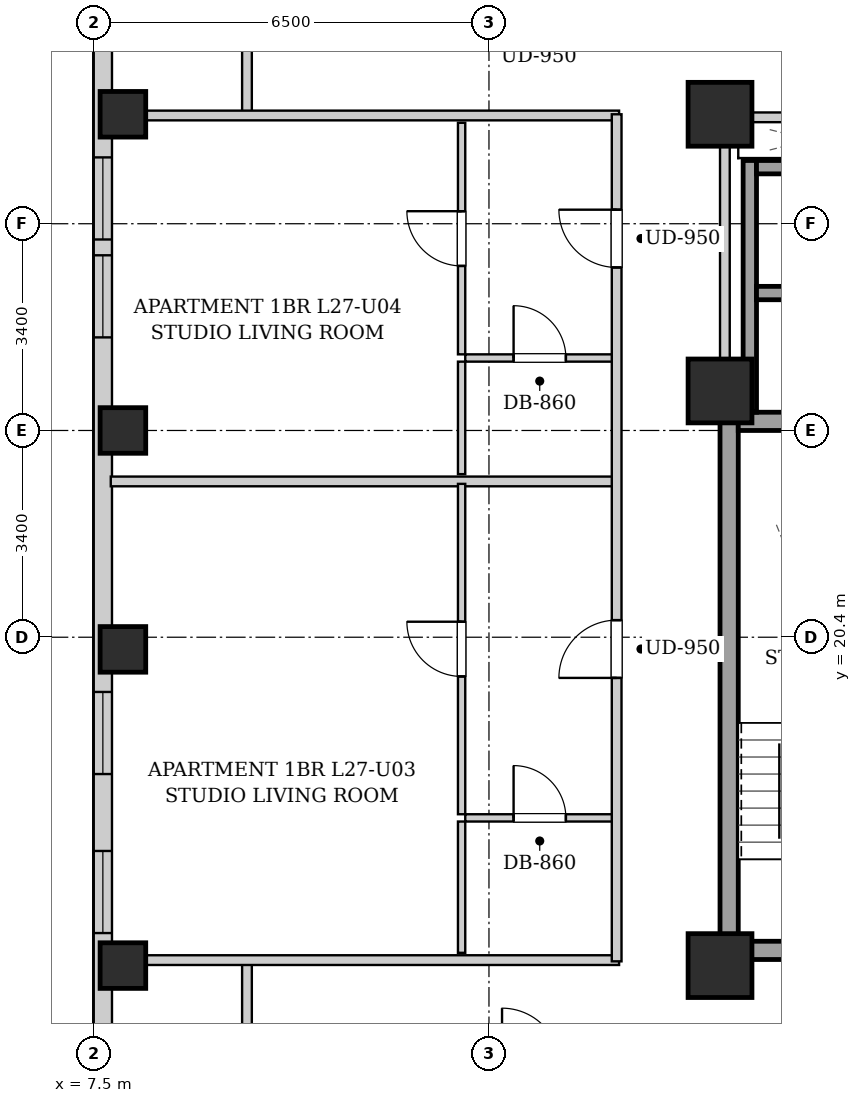
"""IFC4 building model, lengths in metres.
Left out: names, types, materials, properties, quantities, classifications, styles, units other than length and angle.
Written with IfcOpenShell. Run it as: python <this file> out.ifc"""

import sys

from ifc_helpers import new_model, si_unit, direction, frame, frame_2d, origin, origin_2d, place, context, subcontext, project, spatial, rectangle, extrude, element, fill, save


model = new_model("IFC4")
c1 = context("Model", 3, precision=1e-05, world=origin(), true_north=direction((0.0, 1.0)))
c2 = subcontext(c1, "Body", "Model", "MODEL_VIEW")
j1 = project(units=[si_unit("LENGTHUNIT", "METRE"), si_unit("PLANEANGLEUNIT", "RADIAN")], contexts=[c1])
p1 = place(None, origin())
s1 = spatial("IfcSite", under=j1, at=p1, CompositionType="ELEMENT")
p2 = place(p1, origin())
s2 = spatial("IfcBuilding", under=s1, at=p2, CompositionType="ELEMENT")
p3 = place(p2, frame((0.0, 0.0, 97.5)))
s3 = spatial("IfcBuildingStorey", under=s2, at=p3, CompositionType="ELEMENT", Elevation=97.5)
for number, where, z_axis, x_axis in (
    (1, (7.98, 15.0, 0.0), (0.0, 0.0, 1.0), (1.0, 0.0, 0.0)),
    (2, (7.98, 20.2, 0.0), (0.0, 0.0, 1.0), (1.0, 0.0, 0.0)),
    (3, (7.98, 23.8, 0.0), (0.0, 0.0, 1.0), (1.0, 0.0, 0.0)),
    (4, (7.98, 29.0, 0.0), (0.0, 0.0, 1.0), (1.0, 0.0, 0.0)),
):
    element("IfcColumn", number, at=place(p3, frame(where, z_axis=z_axis, x_axis=x_axis)), inside=s3, PredefinedType="COLUMN", context=c2, shape_type="SweptSolid", body=[
        extrude(rectangle(XDim=0.75, YDim=0.75, at=origin_2d()), origin(), (0.0, 0.0, 1.0), 3.2),
    ])
for number, where, z_axis, x_axis in (
    (5, (17.8, 15.0, 0.0), (0.0, 0.0, 1.0), (1.0, 0.0, 0.0)),
    (6, (17.8, 29.0, 0.0), (0.0, 0.0, 1.0), (1.0, 0.0, 0.0)),
    (7, (17.8, 24.45, 0.0), (0.0, 0.0, 1.0), (1.0, 0.0, 0.0)),
):
    element("IfcColumn", number, at=place(p3, frame(where, z_axis=z_axis, x_axis=x_axis)), inside=s3, PredefinedType="COLUMN", context=c2, shape_type="SweptSolid", body=[
        extrude(rectangle(XDim=1.05, YDim=1.05, at=origin_2d()), origin(), (0.0, 0.0, 1.0), 3.2),
    ])
p4 = place(p3, frame((7.65, 2.5, 0.0), z_axis=(0.0, 0.0, 1.0), x_axis=(0.0, 1.0, 0.0)))
e8 = element("IfcWall", 8, at=p4, inside=s3, PredefinedType="SOLIDWALL", context=c2, shape_type="SweptSolid", body=[
    extrude(rectangle(XDim=38.3, YDim=0.3, at=frame_2d((19.15, 0.0))), origin(), (0.0, 0.0, 1.0), 2.94),
])
p5 = place(p4, frame((3.38, 0.0, 0.55)))
e9 = element("IfcOpeningElement", 9, at=p5, cuts=e8, PredefinedType="OPENING", context=c2, shape_type="SweptSolid", body=[
    extrude(rectangle(XDim=1.35, YDim=1.2, at=frame_2d((0.675, 0.6))), frame((0.0, 0.16, 0.0), z_axis=(0.0, -1.0, 0.0), x_axis=(1.0, 0.0, 0.0)), (0.0, 0.0, 1.0), 0.32),
])
p6 = place(p4, frame((1.135, 0.0, 0.55)))
e10 = element("IfcOpeningElement", 10, at=p6, cuts=e8, PredefinedType="OPENING", context=c2, shape_type="SweptSolid", body=[
    extrude(rectangle(XDim=1.35, YDim=1.2, at=frame_2d((0.675, 0.6))), frame((0.0, 0.16, 0.0), z_axis=(0.0, -1.0, 0.0), x_axis=(1.0, 0.0, 0.0)), (0.0, 0.0, 1.0), 0.32),
])
p7 = place(p4, frame((33.946, 0.0, 0.55)))
e11 = element("IfcOpeningElement", 11, at=p7, cuts=e8, PredefinedType="OPENING", context=c2, shape_type="SweptSolid", body=[
    extrude(rectangle(XDim=1.35, YDim=1.2, at=frame_2d((0.675, 0.6))), frame((0.0, 0.16, 0.0), z_axis=(0.0, -1.0, 0.0), x_axis=(1.0, 0.0, 0.0)), (0.0, 0.0, 1.0), 0.32),
])
p8 = place(p4, frame((32.035, 0.0, 0.55)))
e12 = element("IfcOpeningElement", 12, at=p8, cuts=e8, PredefinedType="OPENING", context=c2, shape_type="SweptSolid", body=[
    extrude(rectangle(XDim=1.35, YDim=1.2, at=frame_2d((0.675, 0.6))), frame((0.0, 0.16, 0.0), z_axis=(0.0, -1.0, 0.0), x_axis=(1.0, 0.0, 0.0)), (0.0, 0.0, 1.0), 0.32),
])
p9 = place(p4, frame((15.65, 0.0, 0.55)))
e13 = element("IfcOpeningElement", 13, at=p9, cuts=e8, PredefinedType="OPENING", context=c2, shape_type="SweptSolid", body=[
    extrude(rectangle(XDim=1.35, YDim=1.2, at=frame_2d((0.675, 0.6))), frame((0.0, 0.16, 0.0), z_axis=(0.0, -1.0, 0.0), x_axis=(1.0, 0.0, 0.0)), (0.0, 0.0, 1.0), 0.32),
])
p10 = place(p4, frame((13.035, 0.0, 0.55)))
e14 = element("IfcOpeningElement", 14, at=p10, cuts=e8, PredefinedType="OPENING", context=c2, shape_type="SweptSolid", body=[
    extrude(rectangle(XDim=1.35, YDim=1.2, at=frame_2d((0.675, 0.6))), frame((0.0, 0.16, 0.0), z_axis=(0.0, -1.0, 0.0), x_axis=(1.0, 0.0, 0.0)), (0.0, 0.0, 1.0), 0.32),
])
p11 = place(p4, frame((22.831, 0.0, 0.55)))
e15 = element("IfcOpeningElement", 15, at=p11, cuts=e8, PredefinedType="OPENING", context=c2, shape_type="SweptSolid", body=[
    extrude(rectangle(XDim=1.35, YDim=1.2, at=frame_2d((0.675, 0.6))), frame((0.0, 0.16, 0.0), z_axis=(0.0, -1.0, 0.0), x_axis=(1.0, 0.0, 0.0)), (0.0, 0.0, 1.0), 0.32),
])
p12 = place(p4, frame((24.441, 0.0, 0.55)))
e16 = element("IfcOpeningElement", 16, at=p12, cuts=e8, PredefinedType="OPENING", context=c2, shape_type="SweptSolid", body=[
    extrude(rectangle(XDim=1.35, YDim=1.2, at=frame_2d((0.675, 0.6))), frame((0.0, 0.16, 0.0), z_axis=(0.0, -1.0, 0.0), x_axis=(1.0, 0.0, 0.0)), (0.0, 0.0, 1.0), 0.32),
])
p13 = place(p3, frame((17.95, 15.1, 0.0), z_axis=(0.0, 0.0, 1.0), x_axis=(0.0, 1.0, 0.0)))
e17 = element("IfcWall", 17, at=p13, inside=s3, PredefinedType="SHEAR", context=c2, shape_type="SweptSolid", body=[
    extrude(rectangle(XDim=9.0, YDim=0.3, at=frame_2d((4.5, 0.0))), origin(), (0.0, 0.0, 1.0), 2.94),
])
p14 = place(p3, frame((18.1, 23.95, 0.0), z_axis=(0.0, 0.0, 1.0), x_axis=(1.0, 0.0, 0.0)))
e18 = element("IfcWall", 18, at=p14, inside=s3, PredefinedType="SHEAR", context=c2, shape_type="SweptSolid", body=[
    extrude(rectangle(XDim=2.85, YDim=0.3, at=frame_2d((1.425, 0.0))), origin(), (0.0, 0.0, 1.0), 2.94),
])
p15 = place(p3, frame((18.1, 15.25, 0.0), z_axis=(0.0, 0.0, 1.0), x_axis=(1.0, 0.0, 0.0)))
e19 = element("IfcWall", 19, at=p15, inside=s3, PredefinedType="SHEAR", context=c2, shape_type="SweptSolid", body=[
    extrude(rectangle(XDim=2.85, YDim=0.3, at=frame_2d((1.425, 0.0))), origin(), (0.0, 0.0, 1.0), 2.94),
])
p16 = place(p15, frame((0.86, 0.0, 0.0)))
e20 = element("IfcOpeningElement", 20, at=p16, cuts=e19, PredefinedType="OPENING", context=c2, shape_type="SweptSolid", body=[
    extrude(rectangle(XDim=1.1, YDim=2.05, at=frame_2d((0.55, 1.025))), frame((0.0, 0.16, 0.0), z_axis=(0.0, -1.0, 0.0), x_axis=(1.0, 0.0, 0.0)), (0.0, 0.0, 1.0), 0.32),
])
p17 = place(p3, frame((18.29, 24.1, 0.0), z_axis=(0.0, 0.0, 1.0), x_axis=(0.0, 1.0, 0.0)))
e21 = element("IfcWall", 21, at=p17, inside=s3, PredefinedType="SHEAR", context=c2, shape_type="SweptSolid", body=[
    extrude(rectangle(XDim=4.14, YDim=0.22, at=frame_2d((2.07, 0.0))), origin(), (0.0, 0.0, 1.0), 2.94),
])
for number, where, z_axis, x_axis in (
    (22, (18.4, 26.06, 0.0), (0.0, 0.0, 1.0), (1.0, 0.0, 0.0)),
    (23, (18.4, 28.13, 0.0), (0.0, 0.0, 1.0), (1.0, 0.0, 0.0)),
):
    element("IfcWall", number, at=place(p3, frame(where, z_axis=z_axis, x_axis=x_axis)), inside=s3, PredefinedType="SHEAR", context=c2, shape_type="SweptSolid", body=[
        extrude(rectangle(XDim=1.9, YDim=0.22, at=frame_2d((0.95, 0.0))), origin(), (0.0, 0.0, 1.0), 2.94),
    ])
p18 = place(p3, frame((17.88, 24.12, 0.0), z_axis=(0.0, 0.0, 1.0), x_axis=(0.0, 1.0, 0.0)))
e24 = element("IfcWall", 24, at=p18, inside=s3, PredefinedType="PARTITIONING", context=c2, shape_type="SweptSolid", body=[
    extrude(rectangle(XDim=4.76, YDim=0.16, at=frame_2d((2.38, 0.0))), origin(), (0.0, 0.0, 1.0), 2.275),
])
p19 = place(p3, frame((17.96, 28.95, 0.0), z_axis=(0.0, 0.0, 1.0), x_axis=(1.0, 0.0, 0.0)))
e25 = element("IfcWall", 25, at=p19, inside=s3, PredefinedType="PARTITIONING", context=c2, shape_type="SweptSolid", body=[
    extrude(rectangle(XDim=4.29, YDim=0.16, at=frame_2d((2.145, 0.0))), origin(), (0.0, 0.0, 1.0), 2.313),
])
p20 = place(p19, frame((1.645, 0.0, 0.0)))
e26 = element("IfcOpeningElement", 26, at=p20, cuts=e25, PredefinedType="OPENING", context=c2, shape_type="SweptSolid", body=[
    extrude(rectangle(XDim=0.86, YDim=2.05, at=frame_2d((0.43, 1.025))), frame((0.0, 0.09, 0.0), z_axis=(0.0, -1.0, 0.0), x_axis=(1.0, 0.0, 0.0)), (0.0, 0.0, 1.0), 0.18),
])
for number, where, z_axis, x_axis in (
    (27, (10.02, 13.35, 0.0), (0.0, 0.0, 1.0), (0.0, 1.0, 0.0)),
    (28, (10.02, 28.98, 0.0), (0.0, 0.0, 1.0), (0.0, 1.0, 0.0)),
):
    element("IfcWall", number, at=place(p3, frame(where, z_axis=z_axis, x_axis=x_axis)), inside=s3, PredefinedType="PARTITIONING", context=c2, shape_type="SweptSolid", body=[
        extrude(rectangle(XDim=1.74, YDim=0.16, at=frame_2d((0.87, 0.0))), origin(), (0.0, 0.0, 1.0), 2.94),
    ])
for number, where, z_axis, x_axis in (
    (29, (7.78, 15.09, 0.0), (0.0, 0.0, 1.0), (1.0, 0.0, 0.0)),
    (30, (7.78, 28.98, 0.0), (0.0, 0.0, 1.0), (1.0, 0.0, 0.0)),
):
    element("IfcWall", number, at=place(p3, frame(where, z_axis=z_axis, x_axis=x_axis)), inside=s3, PredefinedType="PARTITIONING", context=c2, shape_type="SweptSolid", body=[
        extrude(rectangle(XDim=8.36, YDim=0.16, at=frame_2d((4.18, 0.0))), origin(), (0.0, 0.0, 1.0), 2.313),
    ])
p21 = place(p3, frame((7.78, 22.962, 0.0), z_axis=(0.0, 0.0, 1.0), x_axis=(1.0, 0.0, 0.0)))
e31 = element("IfcWall", 31, at=p21, inside=s3, PredefinedType="PARTITIONING", context=c2, shape_type="SweptSolid", body=[
    extrude(rectangle(XDim=8.28, YDim=0.16, at=frame_2d((4.14, 0.0))), origin(), (0.0, 0.0, 1.0), 2.94),
])
p22 = place(p3, frame((13.61, 17.429, 0.0), z_axis=(0.0, 0.0, 1.0), x_axis=(1.0, 0.0, 0.0)))
e32 = element("IfcWall", 32, at=p22, inside=s3, PredefinedType="PARTITIONING", context=c2, shape_type="SweptSolid", body=[
    extrude(rectangle(XDim=2.45, YDim=0.12, at=frame_2d((1.225, 0.0))), origin(), (0.0, 0.0, 1.0), 2.94),
])
p23 = place(p22, frame((0.795, 0.0, 0.0)))
e33 = element("IfcOpeningElement", 33, at=p23, cuts=e32, PredefinedType="OPENING", context=c2, shape_type="SweptSolid", body=[
    extrude(rectangle(XDim=0.86, YDim=2.05, at=frame_2d((0.43, 1.025))), frame((0.0, 0.07, 0.0), z_axis=(0.0, -1.0, 0.0), x_axis=(1.0, 0.0, 0.0)), (0.0, 0.0, 1.0), 0.14),
])
p24 = place(p3, frame((13.55, 15.21, 0.0), z_axis=(0.0, 0.0, 1.0), x_axis=(0.0, 1.0, 0.0)))
e34 = element("IfcWall", 34, at=p24, inside=s3, PredefinedType="PARTITIONING", context=c2, shape_type="SweptSolid", body=[
    extrude(rectangle(XDim=2.159, YDim=0.12, at=frame_2d((1.08, 0.0))), origin(), (0.0, 0.0, 1.0), 2.94),
])
p25 = place(p3, frame((13.55, 17.489, 0.0), z_axis=(0.0, 0.0, 1.0), x_axis=(0.0, 1.0, 0.0)))
e35 = element("IfcWall", 35, at=p25, inside=s3, PredefinedType="PARTITIONING", context=c2, shape_type="SweptSolid", body=[
    extrude(rectangle(XDim=5.433, YDim=0.12, at=frame_2d((2.717, 0.0))), origin(), (0.0, 0.0, 1.0), 2.94),
])
p26 = place(p25, frame((2.266, 0.0, 0.0)))
e36 = element("IfcOpeningElement", 36, at=p26, cuts=e35, PredefinedType="OPENING", context=c2, shape_type="SweptSolid", body=[
    extrude(rectangle(XDim=0.9, YDim=2.05, at=frame_2d((0.45, 1.025))), frame((0.0, 0.07, 0.0), z_axis=(0.0, -1.0, 0.0), x_axis=(1.0, 0.0, 0.0)), (0.0, 0.0, 1.0), 0.14),
])
p27 = place(p3, frame((13.61, 24.992, 0.0), z_axis=(0.0, 0.0, 1.0), x_axis=(1.0, 0.0, 0.0)))
e37 = element("IfcWall", 37, at=p27, inside=s3, PredefinedType="PARTITIONING", context=c2, shape_type="SweptSolid", body=[
    extrude(rectangle(XDim=2.45, YDim=0.12, at=frame_2d((1.225, 0.0))), origin(), (0.0, 0.0, 1.0), 2.94),
])
p28 = place(p27, frame((0.795, 0.0, 0.0)))
e38 = element("IfcOpeningElement", 38, at=p28, cuts=e37, PredefinedType="OPENING", context=c2, shape_type="SweptSolid", body=[
    extrude(rectangle(XDim=0.86, YDim=2.05, at=frame_2d((0.43, 1.025))), frame((0.0, 0.07, 0.0), z_axis=(0.0, -1.0, 0.0), x_axis=(1.0, 0.0, 0.0)), (0.0, 0.0, 1.0), 0.14),
])
p29 = place(p3, frame((13.55, 23.082, 0.0), z_axis=(0.0, 0.0, 1.0), x_axis=(0.0, 1.0, 0.0)))
e39 = element("IfcWall", 39, at=p29, inside=s3, PredefinedType="PARTITIONING", context=c2, shape_type="SweptSolid", body=[
    extrude(rectangle(XDim=1.85, YDim=0.12, at=frame_2d((0.925, 0.0))), origin(), (0.0, 0.0, 1.0), 2.94),
])
p30 = place(p3, frame((13.55, 25.052, 0.0), z_axis=(0.0, 0.0, 1.0), x_axis=(0.0, 1.0, 0.0)))
e40 = element("IfcWall", 40, at=p30, inside=s3, PredefinedType="PARTITIONING", context=c2, shape_type="SweptSolid", body=[
    extrude(rectangle(XDim=3.808, YDim=0.12, at=frame_2d((1.904, 0.0))), origin(), (0.0, 0.0, 1.0), 2.94),
])
p31 = place(p30, frame((1.454, 0.0, 0.0)))
e41 = element("IfcOpeningElement", 41, at=p31, cuts=e40, PredefinedType="OPENING", context=c2, shape_type="SweptSolid", body=[
    extrude(rectangle(XDim=0.9, YDim=2.05, at=frame_2d((0.45, 1.025))), frame((0.0, 0.07, 0.0), z_axis=(0.0, -1.0, 0.0), x_axis=(1.0, 0.0, 0.0)), (0.0, 0.0, 1.0), 0.14),
])
p32 = place(p3, frame((16.1, 15.07, 0.0), z_axis=(0.0, 0.0, 1.0), x_axis=(0.0, 1.0, 0.0)))
e42 = element("IfcWall", 42, at=p32, inside=s3, PredefinedType="PARTITIONING", context=c2, shape_type="SweptSolid", body=[
    extrude(rectangle(XDim=13.93, YDim=0.16, at=frame_2d((6.965, 0.0))), origin(), (0.0, 0.0, 1.0), 2.94),
])
p33 = place(p32, frame((4.661, 0.0, 0.0)))
e43 = element("IfcOpeningElement", 43, at=p33, cuts=e42, PredefinedType="OPENING", context=c2, shape_type="SweptSolid", body=[
    extrude(rectangle(XDim=0.95, YDim=2.1, at=frame_2d((0.475, 1.05))), frame((0.0, 0.09, 0.0), z_axis=(0.0, -1.0, 0.0), x_axis=(1.0, 0.0, 0.0)), (0.0, 0.0, 1.0), 0.18),
])
p34 = place(p32, frame((11.411, 0.0, 0.0)))
e44 = element("IfcOpeningElement", 44, at=p34, cuts=e42, PredefinedType="OPENING", context=c2, shape_type="SweptSolid", body=[
    extrude(rectangle(XDim=0.95, YDim=2.1, at=frame_2d((0.475, 1.05))), frame((0.0, 0.09, 0.0), z_axis=(0.0, -1.0, 0.0), x_axis=(1.0, 0.0, 0.0)), (0.0, 0.0, 1.0), 0.18),
])
p35 = place(p23, origin())
e45 = element("IfcDoor", 45, at=p35, inside=s3, OperationType="SINGLE_SWING_LEFT", PredefinedType="DOOR", context=c2, shape_type="SweptSolid", body=[
    extrude(rectangle(XDim=0.86, YDim=2.05, at=frame_2d((0.43, 1.025))), frame((0.0, 0.025, 0.0), z_axis=(0.0, -1.0, 0.0), x_axis=(1.0, 0.0, 0.0)), (0.0, 0.0, 1.0), 0.05),
])
fill(e33, e45)
p36 = place(p26, origin())
e46 = element("IfcDoor", 46, at=p36, inside=s3, OperationType="SINGLE_SWING_RIGHT", PredefinedType="DOOR", context=c2, shape_type="SweptSolid", body=[
    extrude(rectangle(XDim=0.9, YDim=2.05, at=frame_2d((0.45, 1.025))), frame((0.0, 0.025, 0.0), z_axis=(0.0, -1.0, 0.0), x_axis=(1.0, 0.0, 0.0)), (0.0, 0.0, 1.0), 0.05),
])
fill(e36, e46)
p37 = place(p28, origin())
e47 = element("IfcDoor", 47, at=p37, inside=s3, OperationType="SINGLE_SWING_LEFT", PredefinedType="DOOR", context=c2, shape_type="SweptSolid", body=[
    extrude(rectangle(XDim=0.86, YDim=2.05, at=frame_2d((0.43, 1.025))), frame((0.0, 0.025, 0.0), z_axis=(0.0, -1.0, 0.0), x_axis=(1.0, 0.0, 0.0)), (0.0, 0.0, 1.0), 0.05),
])
fill(e38, e47)
p38 = place(p31, origin())
e48 = element("IfcDoor", 48, at=p38, inside=s3, OperationType="SINGLE_SWING_RIGHT", PredefinedType="DOOR", context=c2, shape_type="SweptSolid", body=[
    extrude(rectangle(XDim=0.9, YDim=2.05, at=frame_2d((0.45, 1.025))), frame((0.0, 0.025, 0.0), z_axis=(0.0, -1.0, 0.0), x_axis=(1.0, 0.0, 0.0)), (0.0, 0.0, 1.0), 0.05),
])
fill(e41, e48)
p39 = place(p33, origin())
e49 = element("IfcDoor", 49, at=p39, inside=s3, OperationType="SINGLE_SWING_LEFT", PredefinedType="DOOR", context=c2, shape_type="SweptSolid", body=[
    extrude(rectangle(XDim=0.95, YDim=2.1, at=frame_2d((0.475, 1.05))), frame((0.0, 0.025, 0.0), z_axis=(0.0, -1.0, 0.0), x_axis=(1.0, 0.0, 0.0)), (0.0, 0.0, 1.0), 0.05),
])
fill(e43, e49)
p40 = place(p34, origin())
e50 = element("IfcDoor", 50, at=p40, inside=s3, OperationType="SINGLE_SWING_RIGHT", PredefinedType="DOOR", context=c2, shape_type="SweptSolid", body=[
    extrude(rectangle(XDim=0.95, YDim=2.1, at=frame_2d((0.475, 1.05))), frame((0.0, 0.025, 0.0), z_axis=(0.0, -1.0, 0.0), x_axis=(1.0, 0.0, 0.0)), (0.0, 0.0, 1.0), 0.05),
])
fill(e44, e50)
p41 = place(p9, origin())
e51 = element("IfcWindow", 51, at=p41, inside=s3, PartitioningType="SINGLE_PANEL", PredefinedType="WINDOW", context=c2, shape_type="SweptSolid", body=[
    extrude(rectangle(XDim=1.35, YDim=1.2, at=frame_2d((0.675, 0.6))), frame((0.0, 0.03, 0.0), z_axis=(0.0, -1.0, 0.0), x_axis=(1.0, 0.0, 0.0)), (0.0, 0.0, 1.0), 0.06),
])
fill(e13, e51)
p42 = place(p10, origin())
e52 = element("IfcWindow", 52, at=p42, inside=s3, PartitioningType="SINGLE_PANEL", PredefinedType="WINDOW", context=c2, shape_type="SweptSolid", body=[
    extrude(rectangle(XDim=1.35, YDim=1.2, at=frame_2d((0.675, 0.6))), frame((0.0, 0.03, 0.0), z_axis=(0.0, -1.0, 0.0), x_axis=(1.0, 0.0, 0.0)), (0.0, 0.0, 1.0), 0.06),
])
fill(e14, e52)
p43 = place(p11, origin())
e53 = element("IfcWindow", 53, at=p43, inside=s3, PartitioningType="SINGLE_PANEL", PredefinedType="WINDOW", context=c2, shape_type="SweptSolid", body=[
    extrude(rectangle(XDim=1.35, YDim=1.2, at=frame_2d((0.675, 0.6))), frame((0.0, 0.03, 0.0), z_axis=(0.0, -1.0, 0.0), x_axis=(1.0, 0.0, 0.0)), (0.0, 0.0, 1.0), 0.06),
])
fill(e15, e53)
p44 = place(p12, origin())
e54 = element("IfcWindow", 54, at=p44, inside=s3, PartitioningType="SINGLE_PANEL", PredefinedType="WINDOW", context=c2, shape_type="SweptSolid", body=[
    extrude(rectangle(XDim=1.35, YDim=1.2, at=frame_2d((0.675, 0.6))), frame((0.0, 0.03, 0.0), z_axis=(0.0, -1.0, 0.0), x_axis=(1.0, 0.0, 0.0)), (0.0, 0.0, 1.0), 0.06),
])
fill(e16, e54)
save(model, sys.argv[1])
